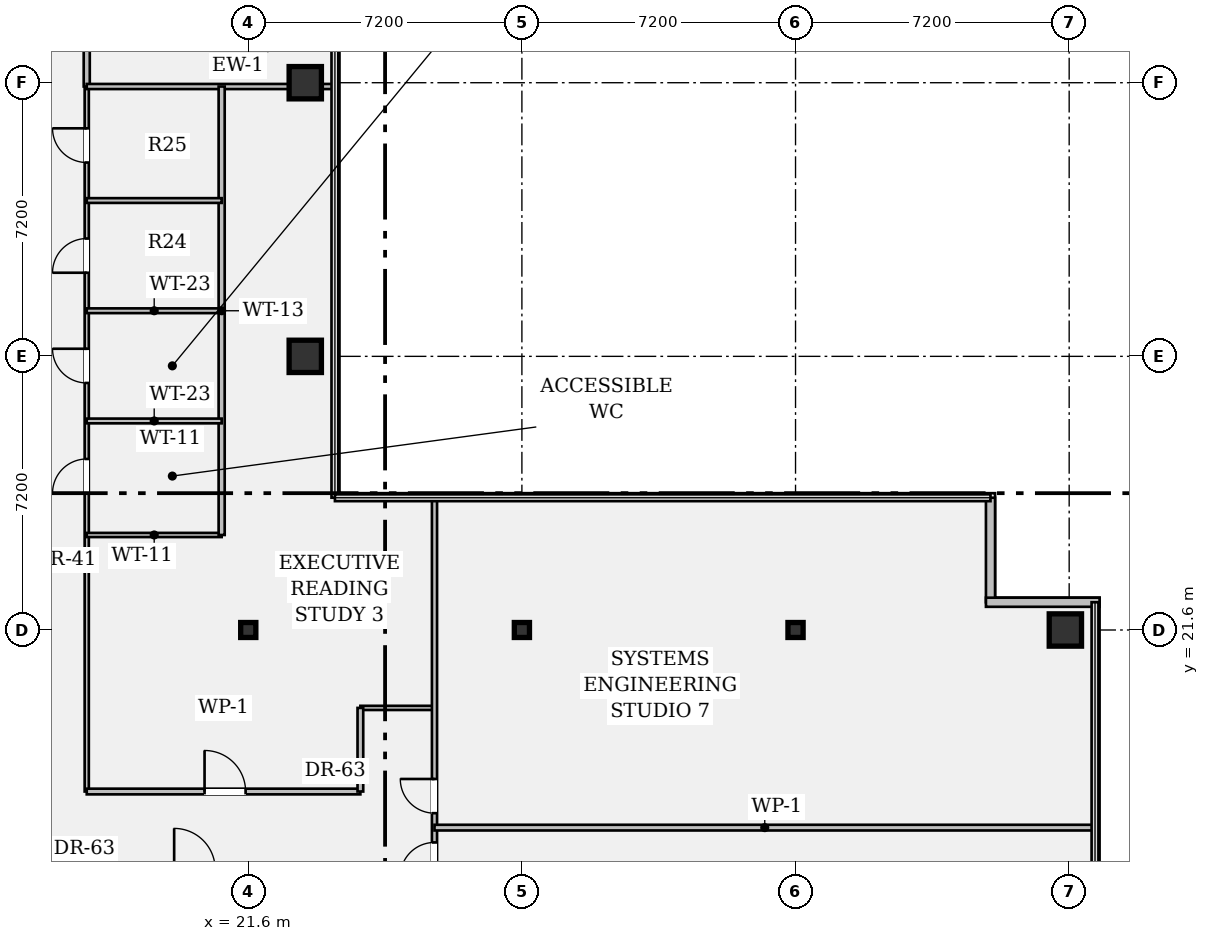
"""IFC4 building model, lengths in metres.
Left out: names, types, materials, properties, quantities, classifications, styles, units other than length and angle.
Written with IfcOpenShell. Run it as: python <this file> out.ifc"""

import sys

from ifc_helpers import new_model, si_unit, direction, frame, frame_2d, origin, origin_2d, place, context, subcontext, project, spatial, rectangle, hollow_rectangle, i_section, extrude, element, fill, save


model = new_model("IFC4")
c1 = context("Model", 3, precision=1e-05, world=origin(), true_north=direction((0.0, 1.0)))
c2 = subcontext(c1, "Body", "Model", "MODEL_VIEW")
j1 = project(units=[si_unit("LENGTHUNIT", "METRE"), si_unit("PLANEANGLEUNIT", "RADIAN")], contexts=[c1])
p1 = place(None, origin())
s1 = spatial("IfcSite", under=j1, at=p1, CompositionType="ELEMENT")
p2 = place(p1, origin())
s2 = spatial("IfcBuilding", under=s1, at=p2, CompositionType="ELEMENT")
p3 = place(p2, frame((0.0, 0.0, 180.25)))
s3 = spatial("IfcBuildingStorey", under=s2, at=p3, CompositionType="ELEMENT", Elevation=180.25)
p4 = place(p3, frame((21.6, 21.6, 0.0), z_axis=(0.0, 0.0, 1.0), x_axis=(1.0, 0.0, 0.0)))
e1 = element("IfcColumn", 1, at=p4, inside=s3, PredefinedType="COLUMN", context=c2, shape_type="SweptSolid", body=[
    extrude(i_section(OverallWidth=0.399, OverallDepth=0.394, WebThickness=0.023, FlangeThickness=0.037, FilletRadius=0.018, at=origin_2d()), origin(), (0.0, 0.0, 1.0), 3.24),
])
for number, where, z_axis, x_axis in (
    (2, (23.1, 28.8, 0.0), (0.0, 0.0, 1.0), (1.0, 0.0, 0.0)),
    (3, (23.1, 36.0, 0.0), (0.0, 0.0, 1.0), (1.0, 0.0, 0.0)),
):
    element("IfcColumn", number, at=place(p3, frame(where, z_axis=z_axis, x_axis=x_axis)), inside=s3, PredefinedType="COLUMN", context=c2, shape_type="SweptSolid", body=[
        extrude(hollow_rectangle(XDim=0.85, YDim=0.85, WallThickness=0.05, at=origin_2d()), origin(), (0.0, 0.0, 1.0), 3.24),
    ])
for number, where, z_axis, x_axis in (
    (4, (28.8, 21.6, 0.0), (0.0, 0.0, 1.0), (1.0, 0.0, 0.0)),
    (5, (36.0, 21.6, 0.0), (0.0, 0.0, 1.0), (1.0, 0.0, 0.0)),
):
    element("IfcColumn", number, at=place(p3, frame(where, z_axis=z_axis, x_axis=x_axis)), inside=s3, PredefinedType="COLUMN", context=c2, shape_type="SweptSolid", body=[
        extrude(i_section(OverallWidth=0.399, OverallDepth=0.394, WebThickness=0.023, FlangeThickness=0.037, FilletRadius=0.018, at=origin_2d()), origin(), (0.0, 0.0, 1.0), 3.24),
    ])
p5 = place(p3, frame((43.1, 21.6, 0.0), z_axis=(0.0, 0.0, 1.0), x_axis=(1.0, 0.0, 0.0)))
e6 = element("IfcColumn", 6, at=p5, inside=s3, PredefinedType="COLUMN", context=c2, shape_type="SweptSolid", body=[
    extrude(hollow_rectangle(XDim=0.85, YDim=0.85, WallThickness=0.05, at=origin_2d()), origin(), (0.0, 0.0, 1.0), 3.24),
])
p6 = place(p3, frame((41.13, 25.08, 0.0), z_axis=(0.0, 0.0, 1.0), x_axis=(0.0, -1.0, 0.0)))
e7 = element("IfcWall", 7, at=p6, inside=s3, PredefinedType="STANDARD", context=c2, shape_type="SweptSolid", body=[
    extrude(rectangle(XDim=2.75, YDim=0.24, at=frame_2d((1.375, 0.0))), origin(), (0.0, 0.0, 1.0), 3.24),
])
p7 = place(p3, frame((41.01, 22.33, 0.0), z_axis=(0.0, 0.0, 1.0), x_axis=(1.0, 0.0, 0.0)))
e8 = element("IfcWall", 8, at=p7, inside=s3, PredefinedType="STANDARD", context=c2, shape_type="SweptSolid", body=[
    extrude(rectangle(XDim=2.99, YDim=0.24, at=frame_2d((1.495, 0.0))), origin(), (0.0, 0.0, 1.0), 3.24),
])
p8 = place(p3, frame((17.35, 17.35, 0.0), z_axis=(0.0, 0.0, 1.0), x_axis=(0.0, 1.0, 0.0)))
e9 = element("IfcWall", 9, at=p8, inside=s3, PredefinedType="PARTITIONING", context=c2, shape_type="SweptSolid", body=[
    extrude(rectangle(XDim=18.55, YDim=0.11, at=frame_2d((9.275, 0.0))), origin(), (0.0, 0.0, 1.0), 2.603),
])
p9 = place(p8, frame((7.85, 0.0, 0.0)))
e10 = element("IfcOpeningElement", 10, at=p9, cuts=e9, PredefinedType="OPENING", context=c2, shape_type="SweptSolid", body=[
    extrude(rectangle(XDim=0.9, YDim=2.15, at=frame_2d((0.45, 1.075))), frame((0.0, 0.067, 0.0), z_axis=(0.0, -1.0, 0.0), x_axis=(1.0, 0.0, 0.0)), (0.0, 0.0, 1.0), 0.134),
])
p10 = place(p8, frame((10.75, 0.0, 0.0)))
e11 = element("IfcOpeningElement", 11, at=p10, cuts=e9, PredefinedType="OPENING", context=c2, shape_type="SweptSolid", body=[
    extrude(rectangle(XDim=0.9, YDim=2.15, at=frame_2d((0.45, 1.075))), frame((0.0, 0.067, 0.0), z_axis=(0.0, -1.0, 0.0), x_axis=(1.0, 0.0, 0.0)), (0.0, 0.0, 1.0), 0.134),
])
p11 = place(p8, frame((13.65, 0.0, 0.0)))
e12 = element("IfcOpeningElement", 12, at=p11, cuts=e9, PredefinedType="OPENING", context=c2, shape_type="SweptSolid", body=[
    extrude(rectangle(XDim=0.9, YDim=2.15, at=frame_2d((0.45, 1.075))), frame((0.0, 0.067, 0.0), z_axis=(0.0, -1.0, 0.0), x_axis=(1.0, 0.0, 0.0)), (0.0, 0.0, 1.0), 0.134),
])
p12 = place(p8, frame((16.55, 0.0, 0.0)))
e13 = element("IfcOpeningElement", 13, at=p12, cuts=e9, PredefinedType="OPENING", context=c2, shape_type="SweptSolid", body=[
    extrude(rectangle(XDim=0.9, YDim=2.15, at=frame_2d((0.45, 1.075))), frame((0.0, 0.067, 0.0), z_axis=(0.0, -1.0, 0.0), x_axis=(1.0, 0.0, 0.0)), (0.0, 0.0, 1.0), 0.134),
])
p13 = place(p3, frame((17.35, 17.35, 0.0), z_axis=(0.0, 0.0, 1.0), x_axis=(1.0, 0.0, 0.0)))
e14 = element("IfcWall", 14, at=p13, inside=s3, PredefinedType="PARTITIONING", context=c2, shape_type="SweptSolid", body=[
    extrude(rectangle(XDim=7.2, YDim=0.15, at=frame_2d((3.6, 0.0))), origin(), (0.0, 0.0, 1.0), 2.603),
])
p14 = place(p13, frame((3.1, 0.0, 0.0)))
e15 = element("IfcOpeningElement", 15, at=p14, cuts=e14, PredefinedType="OPENING", context=c2, shape_type="SweptSolid", body=[
    extrude(rectangle(XDim=1.08, YDim=2.15, at=frame_2d((0.54, 1.075))), frame((0.0, 0.087, 0.0), z_axis=(0.0, -1.0, 0.0), x_axis=(1.0, 0.0, 0.0)), (0.0, 0.0, 1.0), 0.174),
])
p15 = place(p3, frame((24.55, 19.55, 0.0), z_axis=(0.0, 0.0, 1.0), x_axis=(1.0, 0.0, 0.0)))
e16 = element("IfcWall", 16, at=p15, inside=s3, PredefinedType="PARTITIONING", context=c2, shape_type="SweptSolid", body=[
    extrude(rectangle(XDim=1.95, YDim=0.11, at=frame_2d((0.975, 0.0))), origin(), (0.0, 0.0, 1.0), 2.808),
])
p16 = place(p3, frame((24.55, 17.35, 0.0), z_axis=(0.0, 0.0, 1.0), x_axis=(0.0, 1.0, 0.0)))
e17 = element("IfcWall", 17, at=p16, inside=s3, PredefinedType="PARTITIONING", context=c2, shape_type="SweptSolid", body=[
    extrude(rectangle(XDim=2.2, YDim=0.15, at=frame_2d((1.1, 0.0))), origin(), (0.0, 0.0, 1.0), 3.24),
])
p17 = place(p3, frame((26.5, 3.32, 0.0), z_axis=(0.0, 0.0, 1.0), x_axis=(0.0, 1.0, 0.0)))
e18 = element("IfcWall", 18, at=p17, inside=s3, PredefinedType="PARTITIONING", context=c2, shape_type="SweptSolid", body=[
    extrude(rectangle(XDim=21.76, YDim=0.135, at=frame_2d((10.88, 0.0))), origin(), (0.0, 0.0, 1.0), 2.603),
])
p18 = place(p17, frame((11.79, 0.0, 0.0)))
e19 = element("IfcOpeningElement", 19, at=p18, cuts=e18, PredefinedType="OPENING", context=c2, shape_type="SweptSolid", body=[
    extrude(rectangle(XDim=0.9, YDim=2.15, at=frame_2d((0.45, 1.075))), frame((0.0, 0.08, 0.0), z_axis=(0.0, -1.0, 0.0), x_axis=(1.0, 0.0, 0.0)), (0.0, 0.0, 1.0), 0.159),
])
p19 = place(p17, frame((13.46, 0.0, 0.0)))
e20 = element("IfcOpeningElement", 20, at=p19, cuts=e18, PredefinedType="OPENING", context=c2, shape_type="SweptSolid", body=[
    extrude(rectangle(XDim=0.9, YDim=2.15, at=frame_2d((0.45, 1.075))), frame((0.0, 0.08, 0.0), z_axis=(0.0, -1.0, 0.0), x_axis=(1.0, 0.0, 0.0)), (0.0, 0.0, 1.0), 0.159),
])
p20 = place(p3, frame((17.35, 35.9, 0.0), z_axis=(0.0, 0.0, 1.0), x_axis=(0.0, 1.0, 0.0)))
e21 = element("IfcWall", 21, at=p20, inside=s3, PredefinedType="PARTITIONING", context=c2, shape_type="SweptSolid", body=[
    extrude(rectangle(XDim=2.4, YDim=0.16, at=frame_2d((1.2, 0.0))), origin(), (0.0, 0.0, 1.0), 2.603),
])
p21 = place(p3, frame((17.35, 35.9, 0.0), z_axis=(0.0, 0.0, 1.0), x_axis=(1.0, 0.0, 0.0)))
e22 = element("IfcWall", 22, at=p21, inside=s3, PredefinedType="PARTITIONING", context=c2, shape_type="SweptSolid", body=[
    extrude(rectangle(XDim=6.53, YDim=0.135, at=frame_2d((3.265, 0.0))), origin(), (0.0, 0.0, 1.0), 2.603),
])
p22 = place(p3, frame((17.35, 24.1, 0.0), z_axis=(0.0, 0.0, 1.0), x_axis=(1.0, 0.0, 0.0)))
e23 = element("IfcWall", 23, at=p22, inside=s3, PredefinedType="PARTITIONING", context=c2, shape_type="SweptSolid", body=[
    extrude(rectangle(XDim=3.55, YDim=0.11, at=frame_2d((1.775, 0.0))), origin(), (0.0, 0.0, 1.0), 2.808),
])
p23 = place(p3, frame((20.9, 24.1, 0.0), z_axis=(0.0, 0.0, 1.0), x_axis=(0.0, 1.0, 0.0)))
e24 = element("IfcWall", 24, at=p23, inside=s3, PredefinedType="PARTITIONING", context=c2, shape_type="SweptSolid", body=[
    extrude(rectangle(XDim=11.8, YDim=0.16, at=frame_2d((5.9, 0.0))), origin(), (0.0, 0.0, 1.0), 2.603),
])
for number, where, z_axis, x_axis in (
    (25, (17.35, 27.1, 0.0), (0.0, 0.0, 1.0), (1.0, 0.0, 0.0)),
    (26, (17.35, 30.0, 0.0), (0.0, 0.0, 1.0), (1.0, 0.0, 0.0)),
    (27, (17.35, 32.9, 0.0), (0.0, 0.0, 1.0), (1.0, 0.0, 0.0)),
):
    element("IfcWall", number, at=place(p3, frame(where, z_axis=z_axis, x_axis=x_axis)), inside=s3, PredefinedType="PARTITIONING", context=c2, shape_type="SweptSolid", body=[
        extrude(rectangle(XDim=3.55, YDim=0.125, at=frame_2d((1.775, 0.0))), origin(), (0.0, 0.0, 1.0), 2.808),
    ])
p24 = place(p3, frame((26.5, 16.4, 0.0), z_axis=(0.0, 0.0, 1.0), x_axis=(1.0, 0.0, 0.0)))
e28 = element("IfcWall", 28, at=p24, inside=s3, PredefinedType="PARTITIONING", context=c2, shape_type="SweptSolid", body=[
    extrude(rectangle(XDim=17.38, YDim=0.15, at=frame_2d((8.69, 0.0))), origin(), (0.0, 0.0, 1.0), 2.603),
])
p25 = place(p9, origin())
e29 = element("IfcDoor", 29, at=p25, inside=s3, OperationType="SINGLE_SWING_LEFT", PredefinedType="DOOR", context=c2, shape_type="SweptSolid", body=[
    extrude(rectangle(XDim=0.9, YDim=2.15, at=frame_2d((0.45, 1.075))), frame((0.0, 0.025, 0.0), z_axis=(0.0, -1.0, 0.0), x_axis=(1.0, 0.0, 0.0)), (0.0, 0.0, 1.0), 0.05),
])
fill(e10, e29)
p26 = place(p10, origin())
e30 = element("IfcDoor", 30, at=p26, inside=s3, OperationType="SINGLE_SWING_RIGHT", PredefinedType="DOOR", context=c2, shape_type="SweptSolid", body=[
    extrude(rectangle(XDim=0.9, YDim=2.15, at=frame_2d((0.45, 1.075))), frame((0.0, 0.025, 0.0), z_axis=(0.0, -1.0, 0.0), x_axis=(1.0, 0.0, 0.0)), (0.0, 0.0, 1.0), 0.05),
])
fill(e11, e30)
p27 = place(p11, origin())
e31 = element("IfcDoor", 31, at=p27, inside=s3, OperationType="SINGLE_SWING_LEFT", PredefinedType="DOOR", context=c2, shape_type="SweptSolid", body=[
    extrude(rectangle(XDim=0.9, YDim=2.15, at=frame_2d((0.45, 1.075))), frame((0.0, 0.025, 0.0), z_axis=(0.0, -1.0, 0.0), x_axis=(1.0, 0.0, 0.0)), (0.0, 0.0, 1.0), 0.05),
])
fill(e12, e31)
p28 = place(p12, origin())
e32 = element("IfcDoor", 32, at=p28, inside=s3, OperationType="SINGLE_SWING_RIGHT", PredefinedType="DOOR", context=c2, shape_type="SweptSolid", body=[
    extrude(rectangle(XDim=0.9, YDim=2.15, at=frame_2d((0.45, 1.075))), frame((0.0, 0.025, 0.0), z_axis=(0.0, -1.0, 0.0), x_axis=(1.0, 0.0, 0.0)), (0.0, 0.0, 1.0), 0.05),
])
fill(e13, e32)
p29 = place(p14, origin())
e33 = element("IfcDoor", 33, at=p29, inside=s3, OperationType="SINGLE_SWING_LEFT", PredefinedType="DOOR", context=c2, shape_type="SweptSolid", body=[
    extrude(rectangle(XDim=1.08, YDim=2.15, at=frame_2d((0.54, 1.075))), frame((0.0, 0.025, 0.0), z_axis=(0.0, -1.0, 0.0), x_axis=(1.0, 0.0, 0.0)), (0.0, 0.0, 1.0), 0.05),
])
fill(e15, e33)
p30 = place(p18, origin())
e34 = element("IfcDoor", 34, at=p30, inside=s3, OperationType="SINGLE_SWING_LEFT", PredefinedType="DOOR", context=c2, shape_type="SweptSolid", body=[
    extrude(rectangle(XDim=0.9, YDim=2.15, at=frame_2d((0.45, 1.075))), frame((0.0, 0.025, 0.0), z_axis=(0.0, -1.0, 0.0), x_axis=(1.0, 0.0, 0.0)), (0.0, 0.0, 1.0), 0.05),
])
fill(e19, e34)
p31 = place(p19, origin())
e35 = element("IfcDoor", 35, at=p31, inside=s3, OperationType="SINGLE_SWING_RIGHT", PredefinedType="DOOR", context=c2, shape_type="SweptSolid", body=[
    extrude(rectangle(XDim=0.9, YDim=2.15, at=frame_2d((0.45, 1.075))), frame((0.0, 0.025, 0.0), z_axis=(0.0, -1.0, 0.0), x_axis=(1.0, 0.0, 0.0)), (0.0, 0.0, 1.0), 0.05),
])
fill(e20, e35)
save(model, sys.argv[1])
